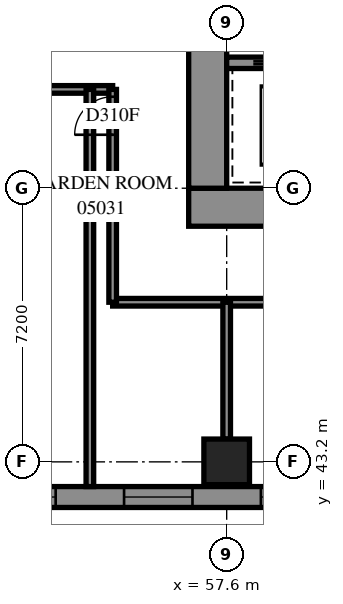
"""IFC4 building model, lengths in metres.
Left out: names, types, materials, properties, quantities, classifications, styles, units other than length and angle.
Written with IfcOpenShell. Run it as: python <this file> out.ifc"""

import sys

from ifc_helpers import new_model, si_unit, direction, frame, frame_2d, origin, origin_2d, place, context, subcontext, project, spatial, polyline, rectangle, outline, extrude, element, fill, save


model = new_model("IFC4")
c1 = context("Model", 3, precision=1e-05, world=origin(), true_north=direction((0.0, 1.0)))
c2 = subcontext(c1, "Body", "Model", "MODEL_VIEW")
j1 = project(units=[si_unit("LENGTHUNIT", "METRE"), si_unit("PLANEANGLEUNIT", "RADIAN")], contexts=[c1])
p1 = place(None, origin())
s1 = spatial("IfcSite", under=j1, at=p1, CompositionType="ELEMENT")
p2 = place(p1, origin())
s2 = spatial("IfcBuilding", under=s1, at=p2, CompositionType="ELEMENT")
p3 = place(p2, frame((0.0, 0.0, 22.8)))
s3 = spatial("IfcBuildingStorey", under=s2, at=p3, CompositionType="ELEMENT", Elevation=22.8)
p4 = place(p3, frame((57.6, 43.2, 0.0), z_axis=(0.0, 0.0, 1.0), x_axis=(1.0, 0.0, 0.0)))
e1 = element("IfcColumn", 1, at=p4, inside=s3, PredefinedType="COLUMN", context=c2, shape_type="SweptSolid", body=[
    extrude(rectangle(XDim=1.2, YDim=1.2, at=origin_2d()), origin(), (0.0, 0.0, 1.0), 3.9),
])
p5 = place(p3, frame((56.6, 49.9, -0.4), z_axis=(0.0, 0.0, 1.0), x_axis=(1.0, 0.0, 0.0)))
e2 = element("IfcWall", 2, at=p5, inside=s3, PredefinedType="SHEAR", context=c2, shape_type="SweptSolid", body=[
    extrude(rectangle(XDim=16.4, YDim=1.0, at=frame_2d((8.2, 0.0))), origin(), (0.0, 0.0, 1.0), 3.6),
])
p6 = place(p3, frame((57.1, 50.4, -0.4), z_axis=(0.0, 0.0, 1.0), x_axis=(0.0, 1.0, 0.0)))
e3 = element("IfcWall", 3, at=p6, inside=s3, PredefinedType="SHEAR", context=c2, shape_type="SweptSolid", body=[
    extrude(rectangle(XDim=14.4, YDim=1.0, at=frame_2d((7.2, 0.0))), origin(), (0.0, 0.0, 1.0), 3.6),
])
p7 = place(p6, frame((4.55, 0.0, 0.4)))
e4 = element("IfcOpeningElement", 4, at=p7, cuts=e3, PredefinedType="OPENING", context=c2, shape_type="SweptSolid", body=[
    extrude(rectangle(XDim=1.1, YDim=2.1, at=frame_2d((0.55, 1.05))), frame((0.0, 0.51, 0.0), z_axis=(0.0, -1.0, 0.0), x_axis=(1.0, 0.0, 0.0)), (0.0, 0.0, 1.0), 1.02),
])
p8 = place(p6, frame((11.35, 0.0, 0.4)))
e5 = element("IfcOpeningElement", 5, at=p8, cuts=e3, PredefinedType="OPENING", context=c2, shape_type="SweptSolid", body=[
    extrude(rectangle(XDim=1.1, YDim=2.1, at=frame_2d((0.55, 1.05))), frame((0.0, 0.51, 0.0), z_axis=(0.0, -1.0, 0.0), x_axis=(1.0, 0.0, 0.0)), (0.0, 0.0, 1.0), 1.02),
])
p9 = place(p3, frame((57.6, 53.7, 0.0), z_axis=(0.0, 0.0, 1.0), x_axis=(1.0, 0.0, 0.0)))
e6 = element("IfcWall", 6, at=p9, inside=s3, PredefinedType="SOLIDWALL", context=c2, shape_type="SweptSolid", body=[
    extrude(rectangle(XDim=14.4, YDim=0.3, at=frame_2d((7.2, 0.0))), origin(), (0.0, 0.0, 1.0), 3.9),
])
p10 = place(p9, frame((1.25, 0.0, 0.0)))
e7 = element("IfcOpeningElement", 7, at=p10, cuts=e6, PredefinedType="OPENING", context=c2, shape_type="SweptSolid", body=[
    extrude(rectangle(XDim=1.1, YDim=2.1, at=frame_2d((0.55, 1.05))), frame((0.0, 0.16, 0.0), z_axis=(0.0, -1.0, 0.0), x_axis=(1.0, 0.0, 0.0)), (0.0, 0.0, 1.0), 0.32),
])
p11 = place(p9, frame((4.85, 0.0, 0.0)))
e8 = element("IfcOpeningElement", 8, at=p11, cuts=e6, PredefinedType="OPENING", context=c2, shape_type="SweptSolid", body=[
    extrude(rectangle(XDim=1.1, YDim=2.1, at=frame_2d((0.55, 1.05))), frame((0.0, 0.16, 0.0), z_axis=(0.0, -1.0, 0.0), x_axis=(1.0, 0.0, 0.0)), (0.0, 0.0, 1.0), 0.32),
])
p12 = place(p9, frame((8.45, 0.0, 0.0)))
e9 = element("IfcOpeningElement", 9, at=p12, cuts=e6, PredefinedType="OPENING", context=c2, shape_type="SweptSolid", body=[
    extrude(rectangle(XDim=1.1, YDim=2.1, at=frame_2d((0.55, 1.05))), frame((0.0, 0.16, 0.0), z_axis=(0.0, -1.0, 0.0), x_axis=(1.0, 0.0, 0.0)), (0.0, 0.0, 1.0), 0.32),
])
p13 = place(p9, frame((12.05, 0.0, 0.0)))
e10 = element("IfcOpeningElement", 10, at=p13, cuts=e6, PredefinedType="OPENING", context=c2, shape_type="SweptSolid", body=[
    extrude(rectangle(XDim=1.1, YDim=2.1, at=frame_2d((0.55, 1.05))), frame((0.0, 0.16, 0.0), z_axis=(0.0, -1.0, 0.0), x_axis=(1.0, 0.0, 0.0)), (0.0, 0.0, 1.0), 0.32),
])
p14 = place(p3, frame((0.275, 42.275, 0.0), z_axis=(0.0, 0.0, 1.0), x_axis=(1.0, 0.0, 0.0)))
e11 = element("IfcWall", 11, at=p14, inside=s3, PredefinedType="SOLIDWALL", context=c2, shape_type="SweptSolid", body=[
    extrude(outline(polyline([(-0.275, -0.275), (76.681, -0.275), (76.909, 0.275), (0.275, 0.275), (-0.275, -0.275)])), origin(), (0.0, 0.0, 1.0), 3.9),
])
p15 = place(p14, frame((1.0, 0.0, 0.7)))
e12 = element("IfcOpeningElement", 12, at=p15, cuts=e11, PredefinedType="OPENING", context=c2, shape_type="SweptSolid", body=[
    extrude(rectangle(XDim=1.8, YDim=2.4, at=frame_2d((0.9, 1.2))), frame((0.0, 0.285, 0.0), z_axis=(0.0, -1.0, 0.0), x_axis=(1.0, 0.0, 0.0)), (0.0, 0.0, 1.0), 0.57),
])
p16 = place(p14, frame((3.825, 0.0, 0.7)))
e13 = element("IfcOpeningElement", 13, at=p16, cuts=e11, PredefinedType="OPENING", context=c2, shape_type="SweptSolid", body=[
    extrude(rectangle(XDim=1.8, YDim=2.4, at=frame_2d((0.9, 1.2))), frame((0.0, 0.285, 0.0), z_axis=(0.0, -1.0, 0.0), x_axis=(1.0, 0.0, 0.0)), (0.0, 0.0, 1.0), 0.57),
])
p17 = place(p14, frame((7.825, 0.0, 0.7)))
e14 = element("IfcOpeningElement", 14, at=p17, cuts=e11, PredefinedType="OPENING", context=c2, shape_type="SweptSolid", body=[
    extrude(rectangle(XDim=1.8, YDim=2.4, at=frame_2d((0.9, 1.2))), frame((0.0, 0.285, 0.0), z_axis=(0.0, -1.0, 0.0), x_axis=(1.0, 0.0, 0.0)), (0.0, 0.0, 1.0), 0.57),
])
p18 = place(p14, frame((11.425, 0.0, 0.7)))
e15 = element("IfcOpeningElement", 15, at=p18, cuts=e11, PredefinedType="OPENING", context=c2, shape_type="SweptSolid", body=[
    extrude(rectangle(XDim=1.8, YDim=2.4, at=frame_2d((0.9, 1.2))), frame((0.0, 0.285, 0.0), z_axis=(0.0, -1.0, 0.0), x_axis=(1.0, 0.0, 0.0)), (0.0, 0.0, 1.0), 0.57),
])
p19 = place(p14, frame((15.025, 0.0, 0.7)))
e16 = element("IfcOpeningElement", 16, at=p19, cuts=e11, PredefinedType="OPENING", context=c2, shape_type="SweptSolid", body=[
    extrude(rectangle(XDim=1.8, YDim=2.4, at=frame_2d((0.9, 1.2))), frame((0.0, 0.285, 0.0), z_axis=(0.0, -1.0, 0.0), x_axis=(1.0, 0.0, 0.0)), (0.0, 0.0, 1.0), 0.57),
])
p20 = place(p14, frame((18.625, 0.0, 0.7)))
e17 = element("IfcOpeningElement", 17, at=p20, cuts=e11, PredefinedType="OPENING", context=c2, shape_type="SweptSolid", body=[
    extrude(rectangle(XDim=1.8, YDim=2.4, at=frame_2d((0.9, 1.2))), frame((0.0, 0.285, 0.0), z_axis=(0.0, -1.0, 0.0), x_axis=(1.0, 0.0, 0.0)), (0.0, 0.0, 1.0), 0.57),
])
p21 = place(p14, frame((22.225, 0.0, 0.7)))
e18 = element("IfcOpeningElement", 18, at=p21, cuts=e11, PredefinedType="OPENING", context=c2, shape_type="SweptSolid", body=[
    extrude(rectangle(XDim=1.8, YDim=2.4, at=frame_2d((0.9, 1.2))), frame((0.0, 0.285, 0.0), z_axis=(0.0, -1.0, 0.0), x_axis=(1.0, 0.0, 0.0)), (0.0, 0.0, 1.0), 0.57),
])
p22 = place(p14, frame((25.825, 0.0, 0.7)))
e19 = element("IfcOpeningElement", 19, at=p22, cuts=e11, PredefinedType="OPENING", context=c2, shape_type="SweptSolid", body=[
    extrude(rectangle(XDim=1.8, YDim=2.4, at=frame_2d((0.9, 1.2))), frame((0.0, 0.285, 0.0), z_axis=(0.0, -1.0, 0.0), x_axis=(1.0, 0.0, 0.0)), (0.0, 0.0, 1.0), 0.57),
])
p23 = place(p14, frame((29.425, 0.0, 0.7)))
e20 = element("IfcOpeningElement", 20, at=p23, cuts=e11, PredefinedType="OPENING", context=c2, shape_type="SweptSolid", body=[
    extrude(rectangle(XDim=1.8, YDim=2.4, at=frame_2d((0.9, 1.2))), frame((0.0, 0.285, 0.0), z_axis=(0.0, -1.0, 0.0), x_axis=(1.0, 0.0, 0.0)), (0.0, 0.0, 1.0), 0.57),
])
p24 = place(p14, frame((33.025, 0.0, 0.7)))
e21 = element("IfcOpeningElement", 21, at=p24, cuts=e11, PredefinedType="OPENING", context=c2, shape_type="SweptSolid", body=[
    extrude(rectangle(XDim=1.8, YDim=2.4, at=frame_2d((0.9, 1.2))), frame((0.0, 0.285, 0.0), z_axis=(0.0, -1.0, 0.0), x_axis=(1.0, 0.0, 0.0)), (0.0, 0.0, 1.0), 0.57),
])
p25 = place(p14, frame((36.625, 0.0, 0.7)))
e22 = element("IfcOpeningElement", 22, at=p25, cuts=e11, PredefinedType="OPENING", context=c2, shape_type="SweptSolid", body=[
    extrude(rectangle(XDim=1.8, YDim=2.4, at=frame_2d((0.9, 1.2))), frame((0.0, 0.285, 0.0), z_axis=(0.0, -1.0, 0.0), x_axis=(1.0, 0.0, 0.0)), (0.0, 0.0, 1.0), 0.57),
])
p26 = place(p14, frame((40.225, 0.0, 0.7)))
e23 = element("IfcOpeningElement", 23, at=p26, cuts=e11, PredefinedType="OPENING", context=c2, shape_type="SweptSolid", body=[
    extrude(rectangle(XDim=1.8, YDim=2.4, at=frame_2d((0.9, 1.2))), frame((0.0, 0.285, 0.0), z_axis=(0.0, -1.0, 0.0), x_axis=(1.0, 0.0, 0.0)), (0.0, 0.0, 1.0), 0.57),
])
p27 = place(p14, frame((43.825, 0.0, 0.7)))
e24 = element("IfcOpeningElement", 24, at=p27, cuts=e11, PredefinedType="OPENING", context=c2, shape_type="SweptSolid", body=[
    extrude(rectangle(XDim=1.8, YDim=2.4, at=frame_2d((0.9, 1.2))), frame((0.0, 0.285, 0.0), z_axis=(0.0, -1.0, 0.0), x_axis=(1.0, 0.0, 0.0)), (0.0, 0.0, 1.0), 0.57),
])
p28 = place(p14, frame((47.425, 0.0, 0.7)))
e25 = element("IfcOpeningElement", 25, at=p28, cuts=e11, PredefinedType="OPENING", context=c2, shape_type="SweptSolid", body=[
    extrude(rectangle(XDim=1.8, YDim=2.4, at=frame_2d((0.9, 1.2))), frame((0.0, 0.285, 0.0), z_axis=(0.0, -1.0, 0.0), x_axis=(1.0, 0.0, 0.0)), (0.0, 0.0, 1.0), 0.57),
])
p29 = place(p14, frame((51.025, 0.0, 0.7)))
e26 = element("IfcOpeningElement", 26, at=p29, cuts=e11, PredefinedType="OPENING", context=c2, shape_type="SweptSolid", body=[
    extrude(rectangle(XDim=1.8, YDim=2.4, at=frame_2d((0.9, 1.2))), frame((0.0, 0.285, 0.0), z_axis=(0.0, -1.0, 0.0), x_axis=(1.0, 0.0, 0.0)), (0.0, 0.0, 1.0), 0.57),
])
p30 = place(p14, frame((54.625, 0.0, 0.7)))
e27 = element("IfcOpeningElement", 27, at=p30, cuts=e11, PredefinedType="OPENING", context=c2, shape_type="SweptSolid", body=[
    extrude(rectangle(XDim=1.8, YDim=2.4, at=frame_2d((0.9, 1.2))), frame((0.0, 0.285, 0.0), z_axis=(0.0, -1.0, 0.0), x_axis=(1.0, 0.0, 0.0)), (0.0, 0.0, 1.0), 0.57),
])
p31 = place(p14, frame((58.225, 0.0, 0.7)))
e28 = element("IfcOpeningElement", 28, at=p31, cuts=e11, PredefinedType="OPENING", context=c2, shape_type="SweptSolid", body=[
    extrude(rectangle(XDim=1.8, YDim=2.4, at=frame_2d((0.9, 1.2))), frame((0.0, 0.285, 0.0), z_axis=(0.0, -1.0, 0.0), x_axis=(1.0, 0.0, 0.0)), (0.0, 0.0, 1.0), 0.57),
])
p32 = place(p14, frame((61.825, 0.0, 0.7)))
e29 = element("IfcOpeningElement", 29, at=p32, cuts=e11, PredefinedType="OPENING", context=c2, shape_type="SweptSolid", body=[
    extrude(rectangle(XDim=1.8, YDim=2.4, at=frame_2d((0.9, 1.2))), frame((0.0, 0.285, 0.0), z_axis=(0.0, -1.0, 0.0), x_axis=(1.0, 0.0, 0.0)), (0.0, 0.0, 1.0), 0.57),
])
p33 = place(p14, frame((65.425, 0.0, 0.7)))
e30 = element("IfcOpeningElement", 30, at=p33, cuts=e11, PredefinedType="OPENING", context=c2, shape_type="SweptSolid", body=[
    extrude(rectangle(XDim=1.8, YDim=2.4, at=frame_2d((0.9, 1.2))), frame((0.0, 0.285, 0.0), z_axis=(0.0, -1.0, 0.0), x_axis=(1.0, 0.0, 0.0)), (0.0, 0.0, 1.0), 0.57),
])
p34 = place(p14, frame((69.025, 0.0, 0.7)))
e31 = element("IfcOpeningElement", 31, at=p34, cuts=e11, PredefinedType="OPENING", context=c2, shape_type="SweptSolid", body=[
    extrude(rectangle(XDim=1.8, YDim=2.4, at=frame_2d((0.9, 1.2))), frame((0.0, 0.285, 0.0), z_axis=(0.0, -1.0, 0.0), x_axis=(1.0, 0.0, 0.0)), (0.0, 0.0, 1.0), 0.57),
])
p35 = place(p14, frame((72.625, 0.0, 0.7)))
e32 = element("IfcOpeningElement", 32, at=p35, cuts=e11, PredefinedType="OPENING", context=c2, shape_type="SweptSolid", body=[
    extrude(rectangle(XDim=1.8, YDim=2.4, at=frame_2d((0.9, 1.2))), frame((0.0, 0.285, 0.0), z_axis=(0.0, -1.0, 0.0), x_axis=(1.0, 0.0, 0.0)), (0.0, 0.0, 1.0), 0.57),
])
p36 = place(p3, frame((0.0, 53.0, 0.0), z_axis=(0.0, 0.0, 1.0), x_axis=(1.0, 0.0, 0.0)))
e33 = element("IfcWall", 33, at=p36, inside=s3, PredefinedType="PARTITIONING", context=c2, shape_type="SweptSolid", body=[
    extrude(rectangle(XDim=54.6, YDim=0.2, at=frame_2d((27.3, 0.0))), origin(), (0.0, 0.0, 1.0), 3.9),
])
p37 = place(p36, frame((8.689, 0.0, 0.0)))
e34 = element("IfcOpeningElement", 34, at=p37, cuts=e33, PredefinedType="OPENING", context=c2, shape_type="SweptSolid", body=[
    extrude(rectangle(XDim=1.0, YDim=2.1, at=frame_2d((0.5, 1.05))), frame((0.0, 0.11, 0.0), z_axis=(0.0, -1.0, 0.0), x_axis=(1.0, 0.0, 0.0)), (0.0, 0.0, 1.0), 0.22),
])
p38 = place(p36, frame((13.174, 0.0, 0.0)))
e35 = element("IfcOpeningElement", 35, at=p38, cuts=e33, PredefinedType="OPENING", context=c2, shape_type="SweptSolid", body=[
    extrude(rectangle(XDim=1.0, YDim=2.1, at=frame_2d((0.5, 1.05))), frame((0.0, 0.11, 0.0), z_axis=(0.0, -1.0, 0.0), x_axis=(1.0, 0.0, 0.0)), (0.0, 0.0, 1.0), 0.22),
])
p39 = place(p36, frame((20.374, 0.0, 0.0)))
e36 = element("IfcOpeningElement", 36, at=p39, cuts=e33, PredefinedType="OPENING", context=c2, shape_type="SweptSolid", body=[
    extrude(rectangle(XDim=1.0, YDim=2.1, at=frame_2d((0.5, 1.05))), frame((0.0, 0.11, 0.0), z_axis=(0.0, -1.0, 0.0), x_axis=(1.0, 0.0, 0.0)), (0.0, 0.0, 1.0), 0.22),
])
p40 = place(p36, frame((27.574, 0.0, 0.0)))
e37 = element("IfcOpeningElement", 37, at=p40, cuts=e33, PredefinedType="OPENING", context=c2, shape_type="SweptSolid", body=[
    extrude(rectangle(XDim=1.0, YDim=2.1, at=frame_2d((0.5, 1.05))), frame((0.0, 0.11, 0.0), z_axis=(0.0, -1.0, 0.0), x_axis=(1.0, 0.0, 0.0)), (0.0, 0.0, 1.0), 0.22),
])
p41 = place(p36, frame((34.774, 0.0, 0.0)))
e38 = element("IfcOpeningElement", 38, at=p41, cuts=e33, PredefinedType="OPENING", context=c2, shape_type="SweptSolid", body=[
    extrude(rectangle(XDim=1.0, YDim=2.1, at=frame_2d((0.5, 1.05))), frame((0.0, 0.11, 0.0), z_axis=(0.0, -1.0, 0.0), x_axis=(1.0, 0.0, 0.0)), (0.0, 0.0, 1.0), 0.22),
])
p42 = place(p36, frame((41.974, 0.0, 0.0)))
e39 = element("IfcOpeningElement", 39, at=p42, cuts=e33, PredefinedType="OPENING", context=c2, shape_type="SweptSolid", body=[
    extrude(rectangle(XDim=1.0, YDim=2.1, at=frame_2d((0.5, 1.05))), frame((0.0, 0.11, 0.0), z_axis=(0.0, -1.0, 0.0), x_axis=(1.0, 0.0, 0.0)), (0.0, 0.0, 1.0), 0.22),
])
p43 = place(p36, frame((49.174, 0.0, 0.0)))
e40 = element("IfcOpeningElement", 40, at=p43, cuts=e33, PredefinedType="OPENING", context=c2, shape_type="SweptSolid", body=[
    extrude(rectangle(XDim=1.0, YDim=2.1, at=frame_2d((0.5, 1.05))), frame((0.0, 0.11, 0.0), z_axis=(0.0, -1.0, 0.0), x_axis=(1.0, 0.0, 0.0)), (0.0, 0.0, 1.0), 0.22),
])
p44 = place(p36, frame((2.406, 0.0, 0.0)))
e41 = element("IfcOpeningElement", 41, at=p44, cuts=e33, PredefinedType="OPENING", context=c2, shape_type="SweptSolid", body=[
    extrude(rectangle(XDim=1.0, YDim=2.1, at=frame_2d((0.5, 1.05))), frame((0.0, 0.11, 0.0), z_axis=(0.0, -1.0, 0.0), x_axis=(1.0, 0.0, 0.0)), (0.0, 0.0, 1.0), 0.22),
])
p45 = place(p36, frame((4.748, 0.0, 0.0)))
e42 = element("IfcOpeningElement", 42, at=p45, cuts=e33, PredefinedType="OPENING", context=c2, shape_type="SweptSolid", body=[
    extrude(rectangle(XDim=1.0, YDim=2.1, at=frame_2d((0.5, 1.05))), frame((0.0, 0.11, 0.0), z_axis=(0.0, -1.0, 0.0), x_axis=(1.0, 0.0, 0.0)), (0.0, 0.0, 1.0), 0.22),
])
p46 = place(p3, frame((54.6, 47.4, 0.0), z_axis=(0.0, 0.0, 1.0), x_axis=(1.0, 0.0, 0.0)))
e43 = element("IfcWall", 43, at=p46, inside=s3, PredefinedType="PARTITIONING", context=c2, shape_type="SweptSolid", body=[
    extrude(rectangle(XDim=19.502, YDim=0.2, at=frame_2d((9.751, 0.0))), origin(), (0.0, 0.0, 1.0), 3.9),
])
p47 = place(p46, frame((6.886, 0.0, 0.0)))
e44 = element("IfcOpeningElement", 44, at=p47, cuts=e43, PredefinedType="OPENING", context=c2, shape_type="SweptSolid", body=[
    extrude(rectangle(XDim=1.0, YDim=2.1, at=frame_2d((0.5, 1.05))), frame((0.0, 0.11, 0.0), z_axis=(0.0, -1.0, 0.0), x_axis=(1.0, 0.0, 0.0)), (0.0, 0.0, 1.0), 0.22),
])
p48 = place(p46, frame((14.086, 0.0, 0.0)))
e45 = element("IfcOpeningElement", 45, at=p48, cuts=e43, PredefinedType="OPENING", context=c2, shape_type="SweptSolid", body=[
    extrude(rectangle(XDim=1.0, YDim=2.1, at=frame_2d((0.5, 1.05))), frame((0.0, 0.11, 0.0), z_axis=(0.0, -1.0, 0.0), x_axis=(1.0, 0.0, 0.0)), (0.0, 0.0, 1.0), 0.22),
])
p49 = place(p3, frame((54.0, 42.55, 0.0), z_axis=(0.0, 0.0, 1.0), x_axis=(0.0, 1.0, 0.0)))
e46 = element("IfcWall", 46, at=p49, inside=s3, PredefinedType="PARTITIONING", context=c2, shape_type="SweptSolid", body=[
    extrude(rectangle(XDim=10.45, YDim=0.2, at=frame_2d((5.225, 0.0))), origin(), (0.0, 0.0, 1.0), 3.9),
])
p50 = place(p3, frame((54.6, 47.4, 0.0), z_axis=(0.0, 0.0, 1.0), x_axis=(0.0, 1.0, 0.0)))
e47 = element("IfcWall", 47, at=p50, inside=s3, PredefinedType="PARTITIONING", context=c2, shape_type="SweptSolid", body=[
    extrude(rectangle(XDim=5.6, YDim=0.2, at=frame_2d((2.8, 0.0))), origin(), (0.0, 0.0, 1.0), 3.9),
])
p51 = place(p50, frame((4.407, 0.0, 0.0)))
e48 = element("IfcOpeningElement", 48, at=p51, cuts=e47, PredefinedType="OPENING", context=c2, shape_type="SweptSolid", body=[
    extrude(rectangle(XDim=1.0, YDim=2.1, at=frame_2d((0.5, 1.05))), frame((0.0, 0.11, 0.0), z_axis=(0.0, -1.0, 0.0), x_axis=(1.0, 0.0, 0.0)), (0.0, 0.0, 1.0), 0.22),
])
p52 = place(p3, frame((57.6, 43.8, 0.0), z_axis=(0.0, 0.0, 1.0), x_axis=(0.0, 1.0, 0.0)))
e49 = element("IfcWall", 49, at=p52, inside=s3, PredefinedType="PARTITIONING", context=c2, shape_type="SweptSolid", body=[
    extrude(rectangle(XDim=3.6, YDim=0.2, at=frame_2d((1.8, 0.0))), origin(), (0.0, 0.0, 1.0), 3.9),
])
p53 = place(p29, origin())
e50 = element("IfcWindow", 50, at=p53, inside=s3, PartitioningType="SINGLE_PANEL", PredefinedType="WINDOW", context=c2, shape_type="SweptSolid", body=[
    extrude(rectangle(XDim=1.8, YDim=2.4, at=frame_2d((0.9, 1.2))), frame((0.0, 0.155, 0.0), z_axis=(0.0, -1.0, 0.0), x_axis=(1.0, 0.0, 0.0)), (0.0, 0.0, 1.0), 0.06),
])
fill(e26, e50)
p54 = place(p30, origin())
e51 = element("IfcWindow", 51, at=p54, inside=s3, PartitioningType="SINGLE_PANEL", PredefinedType="WINDOW", context=c2, shape_type="SweptSolid", body=[
    extrude(rectangle(XDim=1.8, YDim=2.4, at=frame_2d((0.9, 1.2))), frame((0.0, 0.155, 0.0), z_axis=(0.0, -1.0, 0.0), x_axis=(1.0, 0.0, 0.0)), (0.0, 0.0, 1.0), 0.06),
])
fill(e27, e51)
p55 = place(p31, origin())
e52 = element("IfcWindow", 52, at=p55, inside=s3, PartitioningType="SINGLE_PANEL", PredefinedType="WINDOW", context=c2, shape_type="SweptSolid", body=[
    extrude(rectangle(XDim=1.8, YDim=2.4, at=frame_2d((0.9, 1.2))), frame((0.0, 0.155, 0.0), z_axis=(0.0, -1.0, 0.0), x_axis=(1.0, 0.0, 0.0)), (0.0, 0.0, 1.0), 0.06),
])
fill(e28, e52)
p56 = place(p51, origin())
e53 = element("IfcDoor", 53, at=p56, inside=s3, OperationType="SINGLE_SWING_RIGHT", PredefinedType="DOOR", context=c2, shape_type="SweptSolid", body=[
    extrude(rectangle(XDim=1.0, YDim=2.1, at=frame_2d((0.5, 1.05))), frame((0.0, 0.025, 0.0), z_axis=(0.0, -1.0, 0.0), x_axis=(1.0, 0.0, 0.0)), (0.0, 0.0, 1.0), 0.05),
])
fill(e48, e53)
save(model, sys.argv[1])
